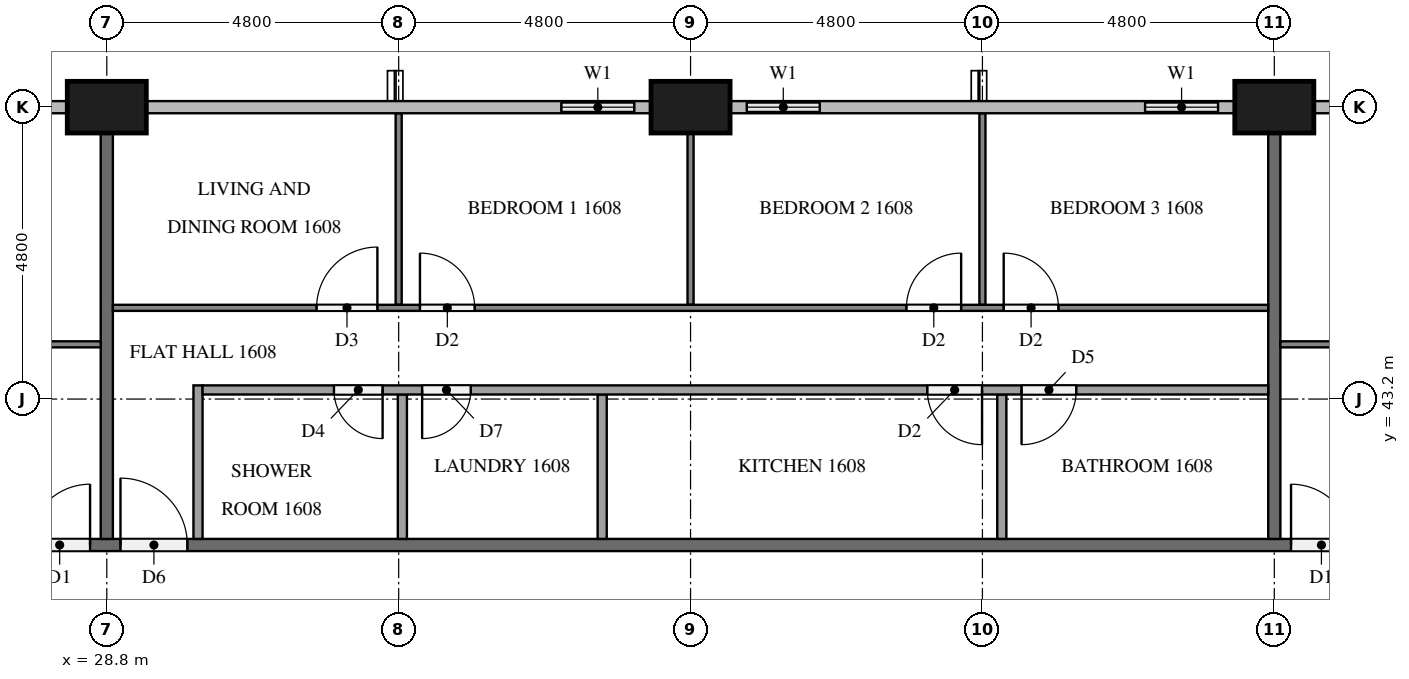
"""IFC4 building model, lengths in metres.
Left out: names, types, materials, properties, quantities, classifications, styles, units other than length and angle.
Written with IfcOpenShell. Run it as: python <this file> out.ifc"""

import sys

from ifc_helpers import new_model, si_unit, direction, frame, frame_2d, origin, origin_2d, place, context, subcontext, project, spatial, rectangle, extrude, element, fill, save


model = new_model("IFC4")
c1 = context("Model", 3, precision=1e-05, world=origin(), true_north=direction((0.0, 1.0)))
c2 = subcontext(c1, "Body", "Model", "MODEL_VIEW")
j1 = project(units=[si_unit("LENGTHUNIT", "METRE"), si_unit("PLANEANGLEUNIT", "RADIAN")], contexts=[c1])
p1 = place(None, origin())
s1 = spatial("IfcSite", under=j1, at=p1, CompositionType="ELEMENT")
p2 = place(p1, origin())
s2 = spatial("IfcBuilding", under=s1, at=p2, CompositionType="ELEMENT")
p3 = place(p2, frame((0.0, 0.0, 66.3)))
s3 = spatial("IfcBuildingStorey", under=s2, at=p3, CompositionType="ELEMENT", Elevation=66.3)
for number, where, z_axis, x_axis in (
    (1, (48.0, 48.0, 0.0), (0.0, 0.0, 1.0), (1.0, 0.0, 0.0)),
    (2, (38.4, 48.0, 0.0), (0.0, 0.0, 1.0), (1.0, 0.0, 0.0)),
    (3, (28.8, 48.0, 0.0), (0.0, 0.0, 1.0), (1.0, 0.0, 0.0)),
):
    element("IfcColumn", number, at=place(p3, frame(where, z_axis=z_axis, x_axis=x_axis)), inside=s3, PredefinedType="COLUMN", context=c2, shape_type="SweptSolid", body=[
        extrude(rectangle(XDim=1.3, YDim=0.85, at=origin_2d()), origin(), (0.0, 0.0, 1.0), 3.2),
    ])
p4 = place(p3, frame((50.4, 48.0, 0.0), z_axis=(0.0, 0.0, 1.0), x_axis=(-1.0, 0.0, 0.0)))
e4 = element("IfcWall", 4, at=p4, inside=s3, PredefinedType="SOLIDWALL", context=c2, shape_type="SweptSolid", body=[
    extrude(rectangle(XDim=1.75, YDim=0.15, at=frame_2d((0.875, 0.0))), origin(), (0.0, 0.0, 1.0), 3.2),
])
p5 = place(p4, frame((0.275, 0.0, 0.9)))
e5 = element("IfcOpeningElement", 5, at=p5, cuts=e4, PredefinedType="OPENING", context=c2, shape_type="SweptSolid", body=[
    extrude(rectangle(XDim=1.2, YDim=1.4, at=frame_2d((0.6, 0.7))), frame((0.0, 0.085, 0.0), z_axis=(0.0, -1.0, 0.0), x_axis=(1.0, 0.0, 0.0)), (0.0, 0.0, 1.0), 0.17),
])
p6 = place(p3, frame((47.35, 48.0, 0.0), z_axis=(0.0, 0.0, 1.0), x_axis=(-1.0, 0.0, 0.0)))
e6 = element("IfcWall", 6, at=p6, inside=s3, PredefinedType="SOLIDWALL", context=c2, shape_type="SweptSolid", body=[
    extrude(rectangle(XDim=1.75, YDim=0.15, at=frame_2d((0.875, 0.0))), origin(), (0.0, 0.0, 1.0), 3.2),
])
p7 = place(p6, frame((0.275, 0.0, 0.9)))
e7 = element("IfcOpeningElement", 7, at=p7, cuts=e6, PredefinedType="OPENING", context=c2, shape_type="SweptSolid", body=[
    extrude(rectangle(XDim=1.2, YDim=1.4, at=frame_2d((0.6, 0.7))), frame((0.0, 0.085, 0.0), z_axis=(0.0, -1.0, 0.0), x_axis=(1.0, 0.0, 0.0)), (0.0, 0.0, 1.0), 0.17),
])
p8 = place(p3, frame((40.8, 48.0, 0.0), z_axis=(0.0, 0.0, 1.0), x_axis=(-1.0, 0.0, 0.0)))
e8 = element("IfcWall", 8, at=p8, inside=s3, PredefinedType="SOLIDWALL", context=c2, shape_type="SweptSolid", body=[
    extrude(rectangle(XDim=1.75, YDim=0.15, at=frame_2d((0.875, 0.0))), origin(), (0.0, 0.0, 1.0), 3.2),
])
p9 = place(p8, frame((0.275, 0.0, 0.9)))
e9 = element("IfcOpeningElement", 9, at=p9, cuts=e8, PredefinedType="OPENING", context=c2, shape_type="SweptSolid", body=[
    extrude(rectangle(XDim=1.2, YDim=1.4, at=frame_2d((0.6, 0.7))), frame((0.0, 0.085, 0.0), z_axis=(0.0, -1.0, 0.0), x_axis=(1.0, 0.0, 0.0)), (0.0, 0.0, 1.0), 0.17),
])
p10 = place(p3, frame((37.75, 48.0, 0.0), z_axis=(0.0, 0.0, 1.0), x_axis=(-1.0, 0.0, 0.0)))
e10 = element("IfcWall", 10, at=p10, inside=s3, PredefinedType="SOLIDWALL", context=c2, shape_type="SweptSolid", body=[
    extrude(rectangle(XDim=1.75, YDim=0.15, at=frame_2d((0.875, 0.0))), origin(), (0.0, 0.0, 1.0), 3.2),
])
p11 = place(p10, frame((0.275, 0.0, 0.9)))
e11 = element("IfcOpeningElement", 11, at=p11, cuts=e10, PredefinedType="OPENING", context=c2, shape_type="SweptSolid", body=[
    extrude(rectangle(XDim=1.2, YDim=1.4, at=frame_2d((0.6, 0.7))), frame((0.0, 0.085, 0.0), z_axis=(0.0, -1.0, 0.0), x_axis=(1.0, 0.0, 0.0)), (0.0, 0.0, 1.0), 0.17),
])
p12 = place(p3, frame((28.15, 48.0, 0.0), z_axis=(0.0, 0.0, 1.0), x_axis=(-1.0, 0.0, 0.0)))
e12 = element("IfcWall", 12, at=p12, inside=s3, PredefinedType="SOLIDWALL", context=c2, shape_type="SweptSolid", body=[
    extrude(rectangle(XDim=1.75, YDim=0.15, at=frame_2d((0.875, 0.0))), origin(), (0.0, 0.0, 1.0), 3.2),
])
p13 = place(p12, frame((0.275, 0.0, 0.9)))
e13 = element("IfcOpeningElement", 13, at=p13, cuts=e12, PredefinedType="OPENING", context=c2, shape_type="SweptSolid", body=[
    extrude(rectangle(XDim=1.2, YDim=1.4, at=frame_2d((0.6, 0.7))), frame((0.0, 0.085, 0.0), z_axis=(0.0, -1.0, 0.0), x_axis=(1.0, 0.0, 0.0)), (0.0, 0.0, 1.0), 0.17),
])
p14 = place(p3, frame((11.9, 40.8, 0.0), z_axis=(0.0, 0.0, 1.0), x_axis=(1.0, 0.0, 0.0)))
e14 = element("IfcWall", 14, at=p14, inside=s3, PredefinedType="PARTITIONING", context=c2, shape_type="SweptSolid", body=[
    extrude(rectangle(XDim=38.6, YDim=0.2, at=frame_2d((19.3, 0.0))), origin(), (0.0, 0.0, 1.0), 3.2),
])
p15 = place(p14, frame((36.375, 0.0, 0.0)))
e15 = element("IfcOpeningElement", 15, at=p15, cuts=e14, PredefinedType="OPENING", context=c2, shape_type="SweptSolid", body=[
    extrude(rectangle(XDim=1.0, YDim=2.1, at=frame_2d((0.5, 1.05))), frame((0.0, 0.11, 0.0), z_axis=(0.0, -1.0, 0.0), x_axis=(1.0, 0.0, 0.0)), (0.0, 0.0, 1.0), 0.22),
])
p16 = place(p14, frame((17.125, 0.0, 0.0)))
e16 = element("IfcOpeningElement", 16, at=p16, cuts=e14, PredefinedType="OPENING", context=c2, shape_type="SweptSolid", body=[
    extrude(rectangle(XDim=1.1, YDim=2.1, at=frame_2d((0.55, 1.05))), frame((0.0, 0.11, 0.0), z_axis=(0.0, -1.0, 0.0), x_axis=(1.0, 0.0, 0.0)), (0.0, 0.0, 1.0), 0.22),
])
p17 = place(p14, frame((15.625, 0.0, 0.0)))
e17 = element("IfcOpeningElement", 17, at=p17, cuts=e14, PredefinedType="OPENING", context=c2, shape_type="SweptSolid", body=[
    extrude(rectangle(XDim=1.0, YDim=2.1, at=frame_2d((0.5, 1.05))), frame((0.0, 0.11, 0.0), z_axis=(0.0, -1.0, 0.0), x_axis=(1.0, 0.0, 0.0)), (0.0, 0.0, 1.0), 0.22),
])
p18 = place(p14, frame((1.225, 0.0, 0.0)))
e18 = element("IfcOpeningElement", 18, at=p18, cuts=e14, PredefinedType="OPENING", context=c2, shape_type="SweptSolid", body=[
    extrude(rectangle(XDim=1.0, YDim=2.1, at=frame_2d((0.5, 1.05))), frame((0.0, 0.11, 0.0), z_axis=(0.0, -1.0, 0.0), x_axis=(1.0, 0.0, 0.0)), (0.0, 0.0, 1.0), 0.22),
])
for number, where, z_axis, x_axis in (
    (19, (48.0, 47.575, 0.0), (0.0, 0.0, 1.0), (0.0, -1.0, 0.0)),
    (20, (28.8, 47.575, 0.0), (0.0, 0.0, 1.0), (0.0, -1.0, 0.0)),
):
    element("IfcWall", number, at=place(p3, frame(where, z_axis=z_axis, x_axis=x_axis)), inside=s3, PredefinedType="PARTITIONING", context=c2, shape_type="SweptSolid", body=[
        extrude(rectangle(XDim=6.675, YDim=0.2, at=frame_2d((3.337, 0.0))), origin(), (0.0, 0.0, 1.0), 3.2),
    ])
p19 = place(p3, frame((48.1, 44.1, 0.0), z_axis=(0.0, 0.0, 1.0), x_axis=(1.0, 0.0, 0.0)))
e21 = element("IfcWall", 21, at=p19, inside=s3, PredefinedType="PARTITIONING", context=c2, shape_type="SweptSolid", body=[
    extrude(rectangle(XDim=13.959, YDim=0.1, at=frame_2d((6.979, 0.0))), origin(), (0.0, 0.0, 1.0), 3.2),
])
p20 = place(p19, frame((3.45, 0.0, 0.0)))
e22 = element("IfcOpeningElement", 22, at=p20, cuts=e21, PredefinedType="OPENING", context=c2, shape_type="SweptSolid", body=[
    extrude(rectangle(XDim=0.9, YDim=2.1, at=frame_2d((0.45, 1.05))), frame((0.0, 0.06, 0.0), z_axis=(0.0, -1.0, 0.0), x_axis=(1.0, 0.0, 0.0)), (0.0, 0.0, 1.0), 0.12),
])
p21 = place(p19, frame((5.05, 0.0, 0.0)))
e23 = element("IfcOpeningElement", 23, at=p21, cuts=e21, PredefinedType="OPENING", context=c2, shape_type="SweptSolid", body=[
    extrude(rectangle(XDim=1.0, YDim=2.1, at=frame_2d((0.5, 1.05))), frame((0.0, 0.06, 0.0), z_axis=(0.0, -1.0, 0.0), x_axis=(1.0, 0.0, 0.0)), (0.0, 0.0, 1.0), 0.12),
])
p22 = place(p19, frame((12.759, 0.0, 0.0)))
e24 = element("IfcOpeningElement", 24, at=p22, cuts=e21, PredefinedType="OPENING", context=c2, shape_type="SweptSolid", body=[
    extrude(rectangle(XDim=0.9, YDim=2.1, at=frame_2d((0.45, 1.05))), frame((0.0, 0.06, 0.0), z_axis=(0.0, -1.0, 0.0), x_axis=(1.0, 0.0, 0.0)), (0.0, 0.0, 1.0), 0.12),
])
p23 = place(p3, frame((33.6, 44.75, 0.0), z_axis=(0.0, 0.0, 1.0), x_axis=(0.0, 1.0, 0.0)))
e25 = element("IfcWall", 25, at=p23, inside=s3, PredefinedType="PARTITIONING", context=c2, shape_type="SweptSolid", body=[
    extrude(rectangle(XDim=3.15, YDim=0.1, at=frame_2d((1.575, 0.0))), origin(), (0.0, 0.0, 1.0), 3.2),
])
p24 = place(p3, frame((38.4, 44.75, 0.0), z_axis=(0.0, 0.0, 1.0), x_axis=(0.0, 1.0, 0.0)))
e26 = element("IfcWall", 26, at=p24, inside=s3, PredefinedType="PARTITIONING", context=c2, shape_type="SweptSolid", body=[
    extrude(rectangle(XDim=2.825, YDim=0.1, at=frame_2d((1.413, 0.0))), origin(), (0.0, 0.0, 1.0), 3.2),
])
p25 = place(p3, frame((43.2, 44.75, 0.0), z_axis=(0.0, 0.0, 1.0), x_axis=(0.0, 1.0, 0.0)))
e27 = element("IfcWall", 27, at=p25, inside=s3, PredefinedType="PARTITIONING", context=c2, shape_type="SweptSolid", body=[
    extrude(rectangle(XDim=3.15, YDim=0.1, at=frame_2d((1.575, 0.0))), origin(), (0.0, 0.0, 1.0), 3.2),
])
p26 = place(p3, frame((28.9, 44.7, 0.0), z_axis=(0.0, 0.0, 1.0), x_axis=(1.0, 0.0, 0.0)))
e28 = element("IfcWall", 28, at=p26, inside=s3, PredefinedType="PARTITIONING", context=c2, shape_type="SweptSolid", body=[
    extrude(rectangle(XDim=19.0, YDim=0.1, at=frame_2d((9.5, 0.0))), origin(), (0.0, 0.0, 1.0), 3.2),
])
p27 = place(p26, frame((3.35, 0.0, 0.0)))
e29 = element("IfcOpeningElement", 29, at=p27, cuts=e28, PredefinedType="OPENING", context=c2, shape_type="SweptSolid", body=[
    extrude(rectangle(XDim=1.0, YDim=2.1, at=frame_2d((0.5, 1.05))), frame((0.0, 0.06, 0.0), z_axis=(0.0, -1.0, 0.0), x_axis=(1.0, 0.0, 0.0)), (0.0, 0.0, 1.0), 0.12),
])
p28 = place(p26, frame((5.05, 0.0, 0.0)))
e30 = element("IfcOpeningElement", 30, at=p28, cuts=e28, PredefinedType="OPENING", context=c2, shape_type="SweptSolid", body=[
    extrude(rectangle(XDim=0.9, YDim=2.1, at=frame_2d((0.45, 1.05))), frame((0.0, 0.06, 0.0), z_axis=(0.0, -1.0, 0.0), x_axis=(1.0, 0.0, 0.0)), (0.0, 0.0, 1.0), 0.12),
])
p29 = place(p26, frame((13.05, 0.0, 0.0)))
e31 = element("IfcOpeningElement", 31, at=p29, cuts=e28, PredefinedType="OPENING", context=c2, shape_type="SweptSolid", body=[
    extrude(rectangle(XDim=0.9, YDim=2.1, at=frame_2d((0.45, 1.05))), frame((0.0, 0.06, 0.0), z_axis=(0.0, -1.0, 0.0), x_axis=(1.0, 0.0, 0.0)), (0.0, 0.0, 1.0), 0.12),
])
p30 = place(p26, frame((14.65, 0.0, 0.0)))
e32 = element("IfcOpeningElement", 32, at=p30, cuts=e28, PredefinedType="OPENING", context=c2, shape_type="SweptSolid", body=[
    extrude(rectangle(XDim=0.9, YDim=2.1, at=frame_2d((0.45, 1.05))), frame((0.0, 0.06, 0.0), z_axis=(0.0, -1.0, 0.0), x_axis=(1.0, 0.0, 0.0)), (0.0, 0.0, 1.0), 0.12),
])
for number, where, z_axis, x_axis in (
    (33, (33.661, 40.9, 0.0), (0.0, 0.0, 1.0), (0.0, 1.0, 0.0)),
    (34, (36.947, 40.9, 0.0), (0.0, 0.0, 1.0), (0.0, 1.0, 0.0)),
    (35, (43.519, 40.9, 0.0), (0.0, 0.0, 1.0), (0.0, 1.0, 0.0)),
):
    element("IfcWall", number, at=place(p3, frame(where, z_axis=z_axis, x_axis=x_axis)), inside=s3, PredefinedType="PARTITIONING", context=c2, shape_type="SweptSolid", body=[
        extrude(rectangle(XDim=2.375, YDim=0.15, at=frame_2d((1.188, 0.0))), origin(), (0.0, 0.0, 1.0), 3.2),
    ])
p31 = place(p3, frame((30.3, 40.9, 0.0), z_axis=(0.0, 0.0, 1.0), x_axis=(0.0, 1.0, 0.0)))
e36 = element("IfcWall", 36, at=p31, inside=s3, PredefinedType="PARTITIONING", context=c2, shape_type="SweptSolid", body=[
    extrude(rectangle(XDim=2.525, YDim=0.15, at=frame_2d((1.263, 0.0))), origin(), (0.0, 0.0, 1.0), 3.2),
])
p32 = place(p3, frame((47.9, 43.35, 0.0), z_axis=(0.0, 0.0, 1.0), x_axis=(-1.0, 0.0, 0.0)))
e37 = element("IfcWall", 37, at=p32, inside=s3, PredefinedType="PARTITIONING", context=c2, shape_type="SweptSolid", body=[
    extrude(rectangle(XDim=17.525, YDim=0.15, at=frame_2d((8.762, 0.0))), origin(), (0.0, 0.0, 1.0), 3.2),
])
p33 = place(p32, frame((14.564, 0.0, 0.0)))
e38 = element("IfcOpeningElement", 38, at=p33, cuts=e37, PredefinedType="OPENING", context=c2, shape_type="SweptSolid", body=[
    extrude(rectangle(XDim=0.8, YDim=2.1, at=frame_2d((0.4, 1.05))), frame((0.0, 0.085, 0.0), z_axis=(0.0, -1.0, 0.0), x_axis=(1.0, 0.0, 0.0)), (0.0, 0.0, 1.0), 0.17),
])
p34 = place(p32, frame((13.114, 0.0, 0.0)))
e39 = element("IfcOpeningElement", 39, at=p34, cuts=e37, PredefinedType="OPENING", context=c2, shape_type="SweptSolid", body=[
    extrude(rectangle(XDim=0.8, YDim=2.1, at=frame_2d((0.4, 1.05))), frame((0.0, 0.085, 0.0), z_axis=(0.0, -1.0, 0.0), x_axis=(1.0, 0.0, 0.0)), (0.0, 0.0, 1.0), 0.17),
])
p35 = place(p32, frame((4.706, 0.0, 0.0)))
e40 = element("IfcOpeningElement", 40, at=p35, cuts=e37, PredefinedType="OPENING", context=c2, shape_type="SweptSolid", body=[
    extrude(rectangle(XDim=0.9, YDim=2.1, at=frame_2d((0.45, 1.05))), frame((0.0, 0.085, 0.0), z_axis=(0.0, -1.0, 0.0), x_axis=(1.0, 0.0, 0.0)), (0.0, 0.0, 1.0), 0.17),
])
p36 = place(p32, frame((3.156, 0.0, 0.0)))
e41 = element("IfcOpeningElement", 41, at=p36, cuts=e37, PredefinedType="OPENING", context=c2, shape_type="SweptSolid", body=[
    extrude(rectangle(XDim=0.9, YDim=2.1, at=frame_2d((0.45, 1.05))), frame((0.0, 0.085, 0.0), z_axis=(0.0, -1.0, 0.0), x_axis=(1.0, 0.0, 0.0)), (0.0, 0.0, 1.0), 0.17),
])
p37 = place(p3, frame((14.5, 44.1, 0.0), z_axis=(0.0, 0.0, 1.0), x_axis=(1.0, 0.0, 0.0)))
e42 = element("IfcWall", 42, at=p37, inside=s3, PredefinedType="PARTITIONING", context=c2, shape_type="SweptSolid", body=[
    extrude(rectangle(XDim=14.2, YDim=0.1, at=frame_2d((7.1, 0.0))), origin(), (0.0, 0.0, 1.0), 3.2),
])
p38 = place(p37, frame((9.85, 0.0, 0.0)))
e43 = element("IfcOpeningElement", 43, at=p38, cuts=e42, PredefinedType="OPENING", context=c2, shape_type="SweptSolid", body=[
    extrude(rectangle(XDim=0.9, YDim=2.1, at=frame_2d((0.45, 1.05))), frame((0.0, 0.06, 0.0), z_axis=(0.0, -1.0, 0.0), x_axis=(1.0, 0.0, 0.0)), (0.0, 0.0, 1.0), 0.12),
])
p39 = place(p37, frame((8.25, 0.0, 0.0)))
e44 = element("IfcOpeningElement", 44, at=p39, cuts=e42, PredefinedType="OPENING", context=c2, shape_type="SweptSolid", body=[
    extrude(rectangle(XDim=0.9, YDim=2.1, at=frame_2d((0.45, 1.05))), frame((0.0, 0.06, 0.0), z_axis=(0.0, -1.0, 0.0), x_axis=(1.0, 0.0, 0.0)), (0.0, 0.0, 1.0), 0.12),
])
p40 = place(p37, frame((0.3, 0.0, 0.0)))
e45 = element("IfcOpeningElement", 45, at=p40, cuts=e42, PredefinedType="OPENING", context=c2, shape_type="SweptSolid", body=[
    extrude(rectangle(XDim=1.0, YDim=2.1, at=frame_2d((0.5, 1.05))), frame((0.0, 0.06, 0.0), z_axis=(0.0, -1.0, 0.0), x_axis=(1.0, 0.0, 0.0)), (0.0, 0.0, 1.0), 0.12),
])
p41 = place(p7, origin())
e46 = element("IfcWindow", 46, at=p41, inside=s3, PartitioningType="SINGLE_PANEL", PredefinedType="WINDOW", context=c2, shape_type="SweptSolid", body=[
    extrude(rectangle(XDim=1.2, YDim=1.4, at=frame_2d((0.6, 0.7))), frame((0.0, 0.03, 0.0), z_axis=(0.0, -1.0, 0.0), x_axis=(1.0, 0.0, 0.0)), (0.0, 0.0, 1.0), 0.06),
])
fill(e7, e46)
p42 = place(p9, origin())
e47 = element("IfcWindow", 47, at=p42, inside=s3, PartitioningType="SINGLE_PANEL", PredefinedType="WINDOW", context=c2, shape_type="SweptSolid", body=[
    extrude(rectangle(XDim=1.2, YDim=1.4, at=frame_2d((0.6, 0.7))), frame((0.0, 0.03, 0.0), z_axis=(0.0, -1.0, 0.0), x_axis=(1.0, 0.0, 0.0)), (0.0, 0.0, 1.0), 0.06),
])
fill(e9, e47)
p43 = place(p11, origin())
e48 = element("IfcWindow", 48, at=p43, inside=s3, PartitioningType="SINGLE_PANEL", PredefinedType="WINDOW", context=c2, shape_type="SweptSolid", body=[
    extrude(rectangle(XDim=1.2, YDim=1.4, at=frame_2d((0.6, 0.7))), frame((0.0, 0.03, 0.0), z_axis=(0.0, -1.0, 0.0), x_axis=(1.0, 0.0, 0.0)), (0.0, 0.0, 1.0), 0.06),
])
fill(e11, e48)
p44 = place(p15, origin())
e49 = element("IfcDoor", 49, at=p44, inside=s3, OperationType="SINGLE_SWING_LEFT", PredefinedType="DOOR", context=c2, shape_type="SweptSolid", body=[
    extrude(rectangle(XDim=1.0, YDim=2.1, at=frame_2d((0.5, 1.05))), frame((0.0, 0.025, 0.0), z_axis=(0.0, -1.0, 0.0), x_axis=(1.0, 0.0, 0.0)), (0.0, 0.0, 1.0), 0.05),
])
fill(e15, e49)
p45 = place(p16, origin())
e50 = element("IfcDoor", 50, at=p45, inside=s3, OperationType="SINGLE_SWING_LEFT", PredefinedType="DOOR", context=c2, shape_type="SweptSolid", body=[
    extrude(rectangle(XDim=1.1, YDim=2.1, at=frame_2d((0.55, 1.05))), frame((0.0, 0.025, 0.0), z_axis=(0.0, -1.0, 0.0), x_axis=(1.0, 0.0, 0.0)), (0.0, 0.0, 1.0), 0.05),
])
fill(e16, e50)
p46 = place(p17, origin())
e51 = element("IfcDoor", 51, at=p46, inside=s3, OperationType="SINGLE_SWING_RIGHT", PredefinedType="DOOR", context=c2, shape_type="SweptSolid", body=[
    extrude(rectangle(XDim=1.0, YDim=2.1, at=frame_2d((0.5, 1.05))), frame((0.0, 0.025, 0.0), z_axis=(0.0, -1.0, 0.0), x_axis=(1.0, 0.0, 0.0)), (0.0, 0.0, 1.0), 0.05),
])
fill(e17, e51)
p47 = place(p27, origin())
e52 = element("IfcDoor", 52, at=p47, inside=s3, OperationType="SINGLE_SWING_RIGHT", PredefinedType="DOOR", context=c2, shape_type="SweptSolid", body=[
    extrude(rectangle(XDim=1.0, YDim=2.1, at=frame_2d((0.5, 1.05))), frame((0.0, 0.025, 0.0), z_axis=(0.0, -1.0, 0.0), x_axis=(1.0, 0.0, 0.0)), (0.0, 0.0, 1.0), 0.05),
])
fill(e29, e52)
p48 = place(p28, origin())
e53 = element("IfcDoor", 53, at=p48, inside=s3, OperationType="SINGLE_SWING_LEFT", PredefinedType="DOOR", context=c2, shape_type="SweptSolid", body=[
    extrude(rectangle(XDim=0.9, YDim=2.1, at=frame_2d((0.45, 1.05))), frame((0.0, 0.025, 0.0), z_axis=(0.0, -1.0, 0.0), x_axis=(1.0, 0.0, 0.0)), (0.0, 0.0, 1.0), 0.05),
])
fill(e30, e53)
p49 = place(p29, origin())
e54 = element("IfcDoor", 54, at=p49, inside=s3, OperationType="SINGLE_SWING_RIGHT", PredefinedType="DOOR", context=c2, shape_type="SweptSolid", body=[
    extrude(rectangle(XDim=0.9, YDim=2.1, at=frame_2d((0.45, 1.05))), frame((0.0, 0.025, 0.0), z_axis=(0.0, -1.0, 0.0), x_axis=(1.0, 0.0, 0.0)), (0.0, 0.0, 1.0), 0.05),
])
fill(e31, e54)
p50 = place(p30, origin())
e55 = element("IfcDoor", 55, at=p50, inside=s3, OperationType="SINGLE_SWING_LEFT", PredefinedType="DOOR", context=c2, shape_type="SweptSolid", body=[
    extrude(rectangle(XDim=0.9, YDim=2.1, at=frame_2d((0.45, 1.05))), frame((0.0, 0.025, 0.0), z_axis=(0.0, -1.0, 0.0), x_axis=(1.0, 0.0, 0.0)), (0.0, 0.0, 1.0), 0.05),
])
fill(e32, e55)
p51 = place(p33, origin())
e56 = element("IfcDoor", 56, at=p51, inside=s3, OperationType="SINGLE_SWING_LEFT", PredefinedType="DOOR", context=c2, shape_type="SweptSolid", body=[
    extrude(rectangle(XDim=0.8, YDim=2.1, at=frame_2d((0.4, 1.05))), frame((0.0, 0.025, 0.0), z_axis=(0.0, -1.0, 0.0), x_axis=(1.0, 0.0, 0.0)), (0.0, 0.0, 1.0), 0.05),
])
fill(e38, e56)
p52 = place(p34, origin())
e57 = element("IfcDoor", 57, at=p52, inside=s3, OperationType="SINGLE_SWING_RIGHT", PredefinedType="DOOR", context=c2, shape_type="SweptSolid", body=[
    extrude(rectangle(XDim=0.8, YDim=2.1, at=frame_2d((0.4, 1.05))), frame((0.0, 0.025, 0.0), z_axis=(0.0, -1.0, 0.0), x_axis=(1.0, 0.0, 0.0)), (0.0, 0.0, 1.0), 0.05),
])
fill(e39, e57)
p53 = place(p35, origin())
e58 = element("IfcDoor", 58, at=p53, inside=s3, OperationType="SINGLE_SWING_LEFT", PredefinedType="DOOR", context=c2, shape_type="SweptSolid", body=[
    extrude(rectangle(XDim=0.9, YDim=2.1, at=frame_2d((0.45, 1.05))), frame((0.0, 0.025, 0.0), z_axis=(0.0, -1.0, 0.0), x_axis=(1.0, 0.0, 0.0)), (0.0, 0.0, 1.0), 0.05),
])
fill(e40, e58)
p54 = place(p36, origin())
e59 = element("IfcDoor", 59, at=p54, inside=s3, OperationType="SINGLE_SWING_RIGHT", PredefinedType="DOOR", context=c2, shape_type="SweptSolid", body=[
    extrude(rectangle(XDim=0.9, YDim=2.1, at=frame_2d((0.45, 1.05))), frame((0.0, 0.025, 0.0), z_axis=(0.0, -1.0, 0.0), x_axis=(1.0, 0.0, 0.0)), (0.0, 0.0, 1.0), 0.05),
])
fill(e41, e59)
save(model, sys.argv[1])
